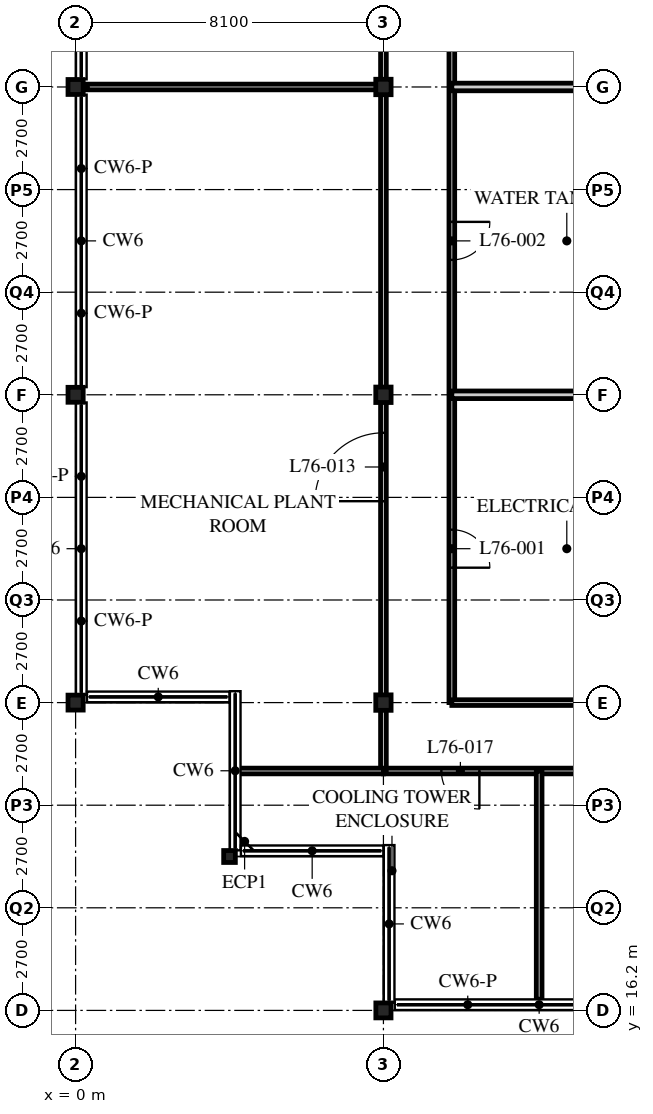
"""IFC4 building model, lengths in metres.
Left out: names, types, materials, properties, quantities, classifications, styles, units other than length and angle.
Written with IfcOpenShell. Run it as: python <this file> out.ifc"""

import sys

from ifc_helpers import new_model, si_unit, direction, frame, frame_2d, origin, origin_2d, place, context, subcontext, project, spatial, rectangle, i_section, extrude, element, fill, save


model = new_model("IFC4")
c1 = context("Model", 3, precision=1e-05, world=origin(), true_north=direction((0.0, 1.0)))
c2 = subcontext(c1, "Body", "Model", "MODEL_VIEW")
j1 = project(units=[si_unit("LENGTHUNIT", "METRE"), si_unit("PLANEANGLEUNIT", "RADIAN")], contexts=[c1])
p1 = place(None, origin())
s1 = spatial("IfcSite", under=j1, at=p1, CompositionType="ELEMENT")
p2 = place(p1, origin())
s2 = spatial("IfcBuilding", under=s1, at=p2, CompositionType="ELEMENT")
p3 = place(p2, frame((0.0, 0.0, 298.5)))
s3 = spatial("IfcBuildingStorey", under=s2, at=p3, CompositionType="ELEMENT", Elevation=298.5)
for number, where, z_axis, x_axis in (
    (1, (0.0, 24.3, 0.0), (0.0, 0.0, 1.0), (1.0, 0.0, 0.0)),
    (2, (0.0, 32.4, 0.0), (0.0, 0.0, 1.0), (1.0, 0.0, 0.0)),
    (3, (0.0, 40.5, 0.0), (0.0, 0.0, 1.0), (1.0, 0.0, 0.0)),
):
    element("IfcColumn", number, at=place(p3, frame(where, z_axis=z_axis, x_axis=x_axis)), inside=s3, PredefinedType="COLUMN", context=c2, shape_type="SweptSolid", body=[
        extrude(i_section(OverallWidth=0.399, OverallDepth=0.394, WebThickness=0.023, FlangeThickness=0.037, FilletRadius=0.015, at=origin_2d()), origin(), (0.0, 0.0, 1.0), 5.4),
    ])
p4 = place(p3, frame((4.05, 20.25, 0.0), z_axis=(0.0, 0.0, 1.0), x_axis=(1.0, 0.0, 0.0)))
e4 = element("IfcColumn", 4, at=p4, inside=s3, PredefinedType="COLUMN", context=c2, shape_type="SweptSolid", body=[
    extrude(i_section(OverallWidth=0.307, OverallDepth=0.314, WebThickness=0.012, FlangeThickness=0.019, FilletRadius=0.015, at=origin_2d()), origin(), (0.0, 0.0, 1.0), 5.4),
])
p5 = place(p3, frame((8.1, 16.2, 0.0), z_axis=(0.0, 0.0, 1.0), x_axis=(1.0, 0.0, 0.0)))
e5 = element("IfcColumn", 5, at=p5, inside=s3, PredefinedType="COLUMN", context=c2, shape_type="SweptSolid", body=[
    extrude(i_section(OverallWidth=0.399, OverallDepth=0.394, WebThickness=0.023, FlangeThickness=0.037, FilletRadius=0.015, at=origin_2d()), origin(), (0.0, 0.0, 1.0), 5.4),
])
for number, where, z_axis, x_axis in (
    (6, (8.1, 24.3, 0.0), (0.0, 0.0, 1.0), (1.0, 0.0, 0.0)),
    (7, (8.1, 32.4, 0.0), (0.0, 0.0, 1.0), (1.0, 0.0, 0.0)),
    (8, (8.1, 40.5, 0.0), (0.0, 0.0, 1.0), (1.0, 0.0, 0.0)),
):
    element("IfcColumn", number, at=place(p3, frame(where, z_axis=z_axis, x_axis=x_axis)), inside=s3, PredefinedType="COLUMN", context=c2, shape_type="SweptSolid", body=[
        extrude(i_section(OverallWidth=0.403, OverallDepth=0.406, WebThickness=0.027, FlangeThickness=0.043, FilletRadius=0.015, at=origin_2d()), origin(), (0.0, 0.0, 1.0), 5.4),
    ])
p6 = place(p3, frame((8.1, 22.5, 0.0), z_axis=(0.0, 0.0, 1.0), x_axis=(1.0, 0.0, 0.0)))
e9 = element("IfcWall", 9, at=p6, inside=s3, PredefinedType="PARTITIONING", context=c2, shape_type="SweptSolid", body=[
    extrude(rectangle(XDim=40.5, YDim=0.15, at=frame_2d((20.25, 0.0))), origin(), (0.0, 0.0, 1.0), 5.19),
])
p7 = place(p6, frame((11.25, 0.0, 0.0)))
e10 = element("IfcOpeningElement", 10, at=p7, cuts=e9, PredefinedType="OPENING", context=c2, shape_type="SweptSolid", body=[
    extrude(rectangle(XDim=1.8, YDim=2.4, at=frame_2d((0.9, 1.2))), frame((0.0, 0.085, 0.0), z_axis=(0.0, -1.0, 0.0), x_axis=(1.0, 0.0, 0.0)), (0.0, 0.0, 1.0), 0.17),
])
p8 = place(p6, frame((27.45, 0.0, 0.0)))
e11 = element("IfcOpeningElement", 11, at=p8, cuts=e9, PredefinedType="OPENING", context=c2, shape_type="SweptSolid", body=[
    extrude(rectangle(XDim=1.8, YDim=2.4, at=frame_2d((0.9, 1.2))), frame((0.0, 0.085, 0.0), z_axis=(0.0, -1.0, 0.0), x_axis=(1.0, 0.0, 0.0)), (0.0, 0.0, 1.0), 0.17),
])
p9 = place(p6, frame((1.525, 0.0, 0.0)))
e12 = element("IfcOpeningElement", 12, at=p9, cuts=e9, PredefinedType="OPENING", context=c2, shape_type="SweptSolid", body=[
    extrude(rectangle(XDim=1.0, YDim=2.1, at=frame_2d((0.5, 1.05))), frame((0.0, 0.085, 0.0), z_axis=(0.0, -1.0, 0.0), x_axis=(1.0, 0.0, 0.0)), (0.0, 0.0, 1.0), 0.17),
])
p10 = place(p6, frame((37.975, 0.0, 0.0)))
e13 = element("IfcOpeningElement", 13, at=p10, cuts=e9, PredefinedType="OPENING", context=c2, shape_type="SweptSolid", body=[
    extrude(rectangle(XDim=1.0, YDim=2.1, at=frame_2d((0.5, 1.05))), frame((0.0, 0.085, 0.0), z_axis=(0.0, -1.0, 0.0), x_axis=(1.0, 0.0, 0.0)), (0.0, 0.0, 1.0), 0.17),
])
p11 = place(p3, frame((8.1, 22.5, 0.0), z_axis=(0.0, 0.0, 1.0), x_axis=(0.0, 1.0, 0.0)))
e14 = element("IfcWall", 14, at=p11, inside=s3, PredefinedType="PARTITIONING", context=c2, shape_type="SweptSolid", body=[
    extrude(rectangle(XDim=34.24, YDim=0.15, at=frame_2d((17.12, 0.0))), origin(), (0.0, 0.0, 1.0), 4.428),
])
p12 = place(p11, frame((7.1, 0.0, 0.0)))
e15 = element("IfcOpeningElement", 15, at=p12, cuts=e14, PredefinedType="OPENING", context=c2, shape_type="SweptSolid", body=[
    extrude(rectangle(XDim=1.8, YDim=2.4, at=frame_2d((0.9, 1.2))), frame((0.0, 0.085, 0.0), z_axis=(0.0, -1.0, 0.0), x_axis=(1.0, 0.0, 0.0)), (0.0, 0.0, 1.0), 0.17),
])
p13 = place(p11, frame((26.95, 0.0, 0.0)))
e16 = element("IfcOpeningElement", 16, at=p13, cuts=e14, PredefinedType="OPENING", context=c2, shape_type="SweptSolid", body=[
    extrude(rectangle(XDim=1.8, YDim=2.4, at=frame_2d((0.9, 1.2))), frame((0.0, 0.085, 0.0), z_axis=(0.0, -1.0, 0.0), x_axis=(1.0, 0.0, 0.0)), (0.0, 0.0, 1.0), 0.17),
])
p14 = place(p3, frame((9.9, 54.9, 0.0), z_axis=(0.0, 0.0, 1.0), x_axis=(0.0, -1.0, 0.0)))
e17 = element("IfcWall", 17, at=p14, inside=s3, PredefinedType="PARTITIONING", context=c2, shape_type="SweptSolid", body=[
    extrude(rectangle(XDim=30.6, YDim=0.15, at=frame_2d((15.3, 0.0))), origin(), (0.0, 0.0, 1.0), 5.19),
])
p15 = place(p14, frame((26.05, 0.0, 0.0)))
e18 = element("IfcOpeningElement", 18, at=p15, cuts=e17, PredefinedType="OPENING", context=c2, shape_type="SweptSolid", body=[
    extrude(rectangle(XDim=1.0, YDim=2.1, at=frame_2d((0.5, 1.05))), frame((0.0, 0.085, 0.0), z_axis=(0.0, -1.0, 0.0), x_axis=(1.0, 0.0, 0.0)), (0.0, 0.0, 1.0), 0.17),
])
p16 = place(p14, frame((17.95, 0.0, 0.0)))
e19 = element("IfcOpeningElement", 19, at=p16, cuts=e17, PredefinedType="OPENING", context=c2, shape_type="SweptSolid", body=[
    extrude(rectangle(XDim=1.0, YDim=2.1, at=frame_2d((0.5, 1.05))), frame((0.0, 0.085, 0.0), z_axis=(0.0, -1.0, 0.0), x_axis=(1.0, 0.0, 0.0)), (0.0, 0.0, 1.0), 0.17),
])
p17 = place(p3, frame((9.9, 24.3, 0.0), z_axis=(0.0, 0.0, 1.0), x_axis=(1.0, 0.0, 0.0)))
e20 = element("IfcWall", 20, at=p17, inside=s3, PredefinedType="PARTITIONING", context=c2, shape_type="SweptSolid", body=[
    extrude(rectangle(XDim=6.1, YDim=0.15, at=frame_2d((3.05, 0.0))), origin(), (0.0, 0.0, 1.0), 4.428),
])
for number, where, z_axis, x_axis in (
    (21, (9.9, 32.4, 0.0), (0.0, 0.0, 1.0), (1.0, 0.0, 0.0)),
    (22, (9.9, 40.5, 0.0), (0.0, 0.0, 1.0), (1.0, 0.0, 0.0)),
):
    element("IfcWall", number, at=place(p3, frame(where, z_axis=z_axis, x_axis=x_axis)), inside=s3, PredefinedType="SOLIDWALL", context=c2, shape_type="SweptSolid", body=[
        extrude(rectangle(XDim=6.3, YDim=0.2, at=frame_2d((3.15, 0.0))), origin(), (0.0, 0.0, 1.0), 4.428),
    ])
p18 = place(p3, frame((8.1, 40.5, 0.0), z_axis=(0.0, 0.0, 1.0), x_axis=(-1.0, 0.0, 0.0)))
e23 = element("IfcWall", 23, at=p18, inside=s3, PredefinedType="PARTITIONING", context=c2, shape_type="SweptSolid", body=[
    extrude(rectangle(XDim=7.8, YDim=0.15, at=frame_2d((3.9, 0.0))), origin(), (0.0, 0.0, 1.0), 4.428),
])
p19 = place(p3, frame((4.223, 22.5, 0.0), z_axis=(0.0, 0.0, 1.0), x_axis=(1.0, 0.0, 0.0)))
e24 = element("IfcWall", 24, at=p19, inside=s3, PredefinedType="PARTITIONING", context=c2, shape_type="SweptSolid", body=[
    extrude(rectangle(XDim=3.877, YDim=0.15, at=frame_2d((1.938, 0.0))), origin(), (0.0, 0.0, 1.0), 5.19),
])
p20 = place(p3, frame((12.198, 22.5, 0.0), z_axis=(0.0, 0.0, 1.0), x_axis=(0.0, -1.0, 0.0)))
e25 = element("IfcWall", 25, at=p20, inside=s3, PredefinedType="PARTITIONING", context=c2, shape_type="SweptSolid", body=[
    extrude(rectangle(XDim=6.007, YDim=0.15, at=frame_2d((3.003, 0.0))), origin(), (0.0, 0.0, 1.0), 5.19),
])
p21 = place(p15, origin())
e26 = element("IfcDoor", 26, at=p21, inside=s3, OperationType="SINGLE_SWING_RIGHT", PredefinedType="DOOR", context=c2, shape_type="SweptSolid", body=[
    extrude(rectangle(XDim=1.0, YDim=2.1, at=frame_2d((0.5, 1.05))), frame((0.0, 0.025, 0.0), z_axis=(0.0, -1.0, 0.0), x_axis=(1.0, 0.0, 0.0)), (0.0, 0.0, 1.0), 0.05),
])
fill(e18, e26)
p22 = place(p16, origin())
e27 = element("IfcDoor", 27, at=p22, inside=s3, OperationType="SINGLE_SWING_LEFT", PredefinedType="DOOR", context=c2, shape_type="SweptSolid", body=[
    extrude(rectangle(XDim=1.0, YDim=2.1, at=frame_2d((0.5, 1.05))), frame((0.0, 0.025, 0.0), z_axis=(0.0, -1.0, 0.0), x_axis=(1.0, 0.0, 0.0)), (0.0, 0.0, 1.0), 0.05),
])
fill(e19, e27)
p23 = place(p12, origin())
e28 = element("IfcDoor", 28, at=p23, inside=s3, OperationType="DOUBLE_DOOR_SINGLE_SWING", PredefinedType="DOOR", context=c2, shape_type="SweptSolid", body=[
    extrude(rectangle(XDim=1.8, YDim=2.4, at=frame_2d((0.9, 1.2))), frame((0.0, 0.025, 0.0), z_axis=(0.0, -1.0, 0.0), x_axis=(1.0, 0.0, 0.0)), (0.0, 0.0, 1.0), 0.05),
])
fill(e15, e28)
p24 = place(p9, origin())
e29 = element("IfcDoor", 29, at=p24, inside=s3, OperationType="SINGLE_SWING_LEFT", PredefinedType="DOOR", context=c2, shape_type="SweptSolid", body=[
    extrude(rectangle(XDim=1.0, YDim=2.1, at=frame_2d((0.5, 1.05))), frame((0.0, 0.025, 0.0), z_axis=(0.0, -1.0, 0.0), x_axis=(1.0, 0.0, 0.0)), (0.0, 0.0, 1.0), 0.05),
])
fill(e12, e29)
save(model, sys.argv[1])
